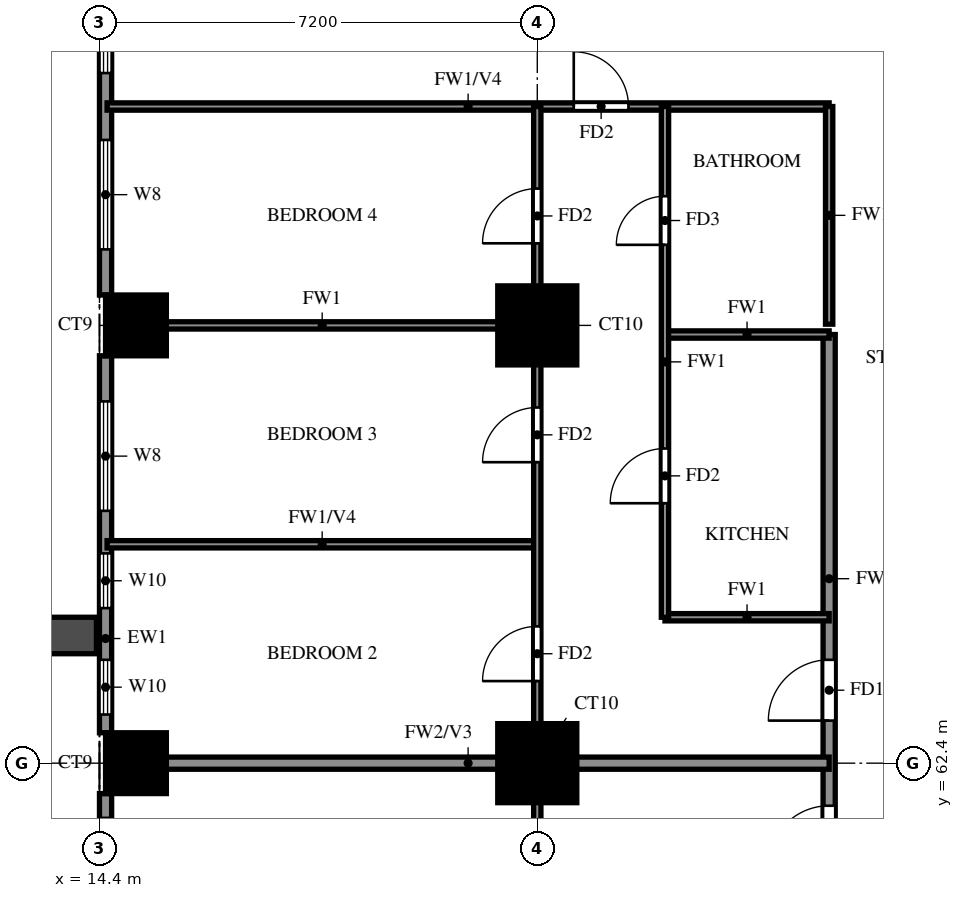
"""IFC4 building model, lengths in metres.
Left out: names, types, materials, properties, quantities, classifications, styles, units other than length and angle.
Written with IfcOpenShell. Run it as: python <this file> out.ifc"""

import sys

from ifc_helpers import new_model, si_unit, direction, frame, frame_2d, origin, origin_2d, place, context, subcontext, project, spatial, rectangle, extrude, source, transform, mapped, element, fill, save


model = new_model("IFC4")
c1 = context("Model", 3, precision=1e-05, world=origin(), true_north=direction((0.0, 1.0)))
c2 = subcontext(c1, "Body", "Model", "MODEL_VIEW")
j1 = project(units=[si_unit("LENGTHUNIT", "METRE"), si_unit("PLANEANGLEUNIT", "RADIAN")], contexts=[c1])
p1 = place(None, origin())
s1 = spatial("IfcSite", under=j1, at=p1, CompositionType="ELEMENT")
p2 = place(p1, origin())
s2 = spatial("IfcBuilding", under=s1, at=p2, CompositionType="ELEMENT")
p3 = place(p2, frame((0.0, 0.0, 72.5)))
s3 = spatial("IfcBuildingStorey", under=s2, at=p3, CompositionType="ELEMENT", Elevation=72.5)
m1 = source(origin(), c2, "Body", "SweptSolid", [
    extrude(rectangle(XDim=1.0, YDim=1.0, at=origin_2d()), origin(), (0.0, 0.0, 1.0), 3.18),
])
p4 = place(p3, frame((15.0, 62.4, 0.0), z_axis=(0.0, 0.0, 1.0), x_axis=(1.0, 0.0, 0.0)))
e1 = element("IfcColumn", 1, at=p4, inside=s3, PredefinedType="COLUMN", context=c2, shape_type="MappedRepresentation", body=[
    mapped(m1, transform((0.0, 0.0, 0.0))),
])
m2 = source(origin(), c2, "Body", "SweptSolid", [
    extrude(rectangle(XDim=1.3, YDim=1.3, at=origin_2d()), origin(), (0.0, 0.0, 1.0), 3.18),
])
p5 = place(p3, frame((21.6, 62.4, 0.0), z_axis=(0.0, 0.0, 1.0), x_axis=(1.0, 0.0, 0.0)))
e2 = element("IfcColumn", 2, at=p5, inside=s3, PredefinedType="COLUMN", context=c2, shape_type="MappedRepresentation", body=[
    mapped(m2, transform((0.0, 0.0, 0.0))),
])
p6 = place(p3, frame((15.0, 69.6, 0.0), z_axis=(0.0, 0.0, 1.0), x_axis=(1.0, 0.0, 0.0)))
e3 = element("IfcColumn", 3, at=p6, inside=s3, PredefinedType="COLUMN", context=c2, shape_type="MappedRepresentation", body=[
    mapped(m1, transform((0.0, 0.0, 0.0))),
])
p7 = place(p3, frame((21.6, 69.6, 0.0), z_axis=(0.0, 0.0, 1.0), x_axis=(1.0, 0.0, 0.0)))
e4 = element("IfcColumn", 4, at=p7, inside=s3, PredefinedType="COLUMN", context=c2, shape_type="MappedRepresentation", body=[
    mapped(m2, transform((0.0, 0.0, 0.0))),
])
p8 = place(p3, frame((14.5, 76.3, 0.0), z_axis=(0.0, 0.0, 1.0), x_axis=(0.0, -1.0, 0.0)))
e5 = element("IfcWall", 5, at=p8, inside=s3, PredefinedType="SOLIDWALL", context=c2, shape_type="SweptSolid", body=[
    extrude(rectangle(XDim=6.2, YDim=0.2, at=frame_2d((3.1, 0.0))), origin(), (0.0, 0.0, 1.0), 3.18),
])
p9 = place(p8, frame((3.65, 0.0, 0.6)))
e6 = element("IfcOpeningElement", 6, at=p9, cuts=e5, PredefinedType="OPENING", context=c2, shape_type="SweptSolid", body=[
    extrude(rectangle(XDim=1.8, YDim=2.4, at=frame_2d((0.9, 1.2))), frame((0.0, 0.11, 0.0), z_axis=(0.0, -1.0, 0.0), x_axis=(1.0, 0.0, 0.0)), (0.0, 0.0, 1.0), 0.22),
])
p10 = place(p8, frame((0.75, 0.0, 0.6)))
e7 = element("IfcOpeningElement", 7, at=p10, cuts=e5, PredefinedType="OPENING", context=c2, shape_type="SweptSolid", body=[
    extrude(rectangle(XDim=1.8, YDim=2.4, at=frame_2d((0.9, 1.2))), frame((0.0, 0.11, 0.0), z_axis=(0.0, -1.0, 0.0), x_axis=(1.0, 0.0, 0.0)), (0.0, 0.0, 1.0), 0.22),
])
p11 = place(p3, frame((14.5, 69.1, 0.0), z_axis=(0.0, 0.0, 1.0), x_axis=(0.0, -1.0, 0.0)))
e8 = element("IfcWall", 8, at=p11, inside=s3, PredefinedType="SOLIDWALL", context=c2, shape_type="SweptSolid", body=[
    extrude(rectangle(XDim=6.2, YDim=0.2, at=frame_2d((3.1, 0.0))), origin(), (0.0, 0.0, 1.0), 3.18),
])
p12 = place(p11, frame((3.25, 0.0, 0.6)))
e9 = element("IfcOpeningElement", 9, at=p12, cuts=e8, PredefinedType="OPENING", context=c2, shape_type="SweptSolid", body=[
    extrude(rectangle(XDim=0.9, YDim=2.4, at=frame_2d((0.45, 1.2))), frame((0.0, 0.11, 0.0), z_axis=(0.0, -1.0, 0.0), x_axis=(1.0, 0.0, 0.0)), (0.0, 0.0, 1.0), 0.22),
])
p13 = place(p11, frame((5.0, 0.0, 0.6)))
e10 = element("IfcOpeningElement", 10, at=p13, cuts=e8, PredefinedType="OPENING", context=c2, shape_type="SweptSolid", body=[
    extrude(rectangle(XDim=0.9, YDim=2.4, at=frame_2d((0.45, 1.2))), frame((0.0, 0.11, 0.0), z_axis=(0.0, -1.0, 0.0), x_axis=(1.0, 0.0, 0.0)), (0.0, 0.0, 1.0), 0.22),
])
p14 = place(p11, frame((0.75, 0.0, 0.6)))
e11 = element("IfcOpeningElement", 11, at=p14, cuts=e8, PredefinedType="OPENING", context=c2, shape_type="SweptSolid", body=[
    extrude(rectangle(XDim=1.8, YDim=2.4, at=frame_2d((0.9, 1.2))), frame((0.0, 0.11, 0.0), z_axis=(0.0, -1.0, 0.0), x_axis=(1.0, 0.0, 0.0)), (0.0, 0.0, 1.0), 0.22),
])
p15 = place(p3, frame((14.5, 61.9, 0.0), z_axis=(0.0, 0.0, 1.0), x_axis=(0.0, -1.0, 0.0)))
e12 = element("IfcWall", 12, at=p15, inside=s3, PredefinedType="SOLIDWALL", context=c2, shape_type="SweptSolid", body=[
    extrude(rectangle(XDim=6.2, YDim=0.2, at=frame_2d((3.1, 0.0))), origin(), (0.0, 0.0, 1.0), 3.18),
])
p16 = place(p15, frame((0.4, 0.0, 0.0)))
e13 = element("IfcOpeningElement", 13, at=p16, cuts=e12, PredefinedType="OPENING", context=c2, shape_type="SweptSolid", body=[
    extrude(rectangle(XDim=1.8, YDim=2.4, at=frame_2d((0.9, 1.2))), frame((0.0, 0.11, 0.0), z_axis=(0.0, -1.0, 0.0), x_axis=(1.0, 0.0, 0.0)), (0.0, 0.0, 1.0), 0.22),
])
p17 = place(p15, frame((4.55, 0.0, 0.6)))
e14 = element("IfcOpeningElement", 14, at=p17, cuts=e12, PredefinedType="OPENING", context=c2, shape_type="SweptSolid", body=[
    extrude(rectangle(XDim=1.2, YDim=2.4, at=frame_2d((0.6, 1.2))), frame((0.0, 0.11, 0.0), z_axis=(0.0, -1.0, 0.0), x_axis=(1.0, 0.0, 0.0)), (0.0, 0.0, 1.0), 0.22),
])
p18 = place(p3, frame((14.35, 64.5, 0.0), z_axis=(0.0, 0.0, 1.0), x_axis=(-1.0, 0.0, 0.0)))
e15 = element("IfcWall", 15, at=p18, inside=s3, PredefinedType="SOLIDWALL", context=c2, shape_type="SweptSolid", body=[
    extrude(rectangle(XDim=2.65, YDim=0.6, at=frame_2d((1.325, 0.0))), origin(), (0.0, 0.0, 1.0), 2.85),
])
p19 = place(p3, frame((26.4, 60.0, 0.0), z_axis=(0.0, 0.0, 1.0), x_axis=(0.0, 1.0, 0.0)))
e16 = element("IfcWall", 16, at=p19, inside=s3, PredefinedType="SOLIDWALL", context=c2, shape_type="SweptSolid", body=[
    extrude(rectangle(XDim=9.45, YDim=0.2, at=frame_2d((4.725, 0.0))), origin(), (0.0, 0.0, 1.0), 3.18),
])
p20 = place(p19, frame((0.7, 0.0, 0.0)))
e17 = element("IfcOpeningElement", 17, at=p20, cuts=e16, PredefinedType="OPENING", context=c2, shape_type="SweptSolid", body=[
    extrude(rectangle(XDim=1.0, YDim=2.1, at=frame_2d((0.5, 1.05))), frame((0.0, 0.11, 0.0), z_axis=(0.0, -1.0, 0.0), x_axis=(1.0, 0.0, 0.0)), (0.0, 0.0, 1.0), 0.22),
])
p21 = place(p19, frame((3.1, 0.0, 0.0)))
e18 = element("IfcOpeningElement", 18, at=p21, cuts=e16, PredefinedType="OPENING", context=c2, shape_type="SweptSolid", body=[
    extrude(rectangle(XDim=1.0, YDim=2.1, at=frame_2d((0.5, 1.05))), frame((0.0, 0.11, 0.0), z_axis=(0.0, -1.0, 0.0), x_axis=(1.0, 0.0, 0.0)), (0.0, 0.0, 1.0), 0.22),
])
p22 = place(p3, frame((14.525, 62.4, 0.0), z_axis=(0.0, 0.0, 1.0), x_axis=(1.0, 0.0, 0.0)))
e19 = element("IfcWall", 19, at=p22, inside=s3, PredefinedType="SOLIDWALL", context=c2, shape_type="SweptSolid", body=[
    extrude(rectangle(XDim=11.875, YDim=0.2, at=frame_2d((5.938, 0.0))), origin(), (0.0, 0.0, 1.0), 3.18),
])
p23 = place(p3, frame((23.7, 64.8, 0.0), z_axis=(0.0, 0.0, 1.0), x_axis=(1.0, 0.0, 0.0)))
e20 = element("IfcWall", 20, at=p23, inside=s3, PredefinedType="PARTITIONING", context=c2, shape_type="SweptSolid", body=[
    extrude(rectangle(XDim=2.7, YDim=0.12, at=frame_2d((1.35, 0.0))), origin(), (0.0, 0.0, 1.0), 3.18),
])
p24 = place(p3, frame((14.525, 66.0, 0.0), z_axis=(0.0, 0.0, 1.0), x_axis=(1.0, 0.0, 0.0)))
e21 = element("IfcWall", 21, at=p24, inside=s3, PredefinedType="PARTITIONING", context=c2, shape_type="SweptSolid", body=[
    extrude(rectangle(XDim=7.075, YDim=0.12, at=frame_2d((3.538, 0.0))), origin(), (0.0, 0.0, 1.0), 2.28),
])
p25 = place(p3, frame((23.7, 69.45, 0.0), z_axis=(0.0, 0.0, 1.0), x_axis=(1.0, 0.0, 0.0)))
e22 = element("IfcWall", 22, at=p25, inside=s3, PredefinedType="PARTITIONING", context=c2, shape_type="SweptSolid", body=[
    extrude(rectangle(XDim=2.7, YDim=0.12, at=frame_2d((1.35, 0.0))), origin(), (0.0, 0.0, 1.0), 3.18),
])
p26 = place(p3, frame((14.525, 69.6, 0.0), z_axis=(0.0, 0.0, 1.0), x_axis=(1.0, 0.0, 0.0)))
e23 = element("IfcWall", 23, at=p26, inside=s3, PredefinedType="PARTITIONING", context=c2, shape_type="SweptSolid", body=[
    extrude(rectangle(XDim=7.075, YDim=0.12, at=frame_2d((3.538, 0.0))), origin(), (0.0, 0.0, 1.0), 3.18),
])
p27 = place(p3, frame((14.525, 73.2, 0.0), z_axis=(0.0, 0.0, 1.0), x_axis=(1.0, 0.0, 0.0)))
e24 = element("IfcWall", 24, at=p27, inside=s3, PredefinedType="PARTITIONING", context=c2, shape_type="SweptSolid", body=[
    extrude(rectangle(XDim=11.875, YDim=0.12, at=frame_2d((5.938, 0.0))), origin(), (0.0, 0.0, 1.0), 2.28),
])
p28 = place(p27, frame((7.675, 0.0, 0.0)))
e25 = element("IfcOpeningElement", 25, at=p28, cuts=e24, PredefinedType="OPENING", context=c2, shape_type="SweptSolid", body=[
    extrude(rectangle(XDim=0.9, YDim=2.1, at=frame_2d((0.45, 1.05))), frame((0.0, 0.07, 0.0), z_axis=(0.0, -1.0, 0.0), x_axis=(1.0, 0.0, 0.0)), (0.0, 0.0, 1.0), 0.14),
])
p29 = place(p3, frame((21.6, 33.725, 0.0), z_axis=(0.0, 0.0, 1.0), x_axis=(0.0, 1.0, 0.0)))
e26 = element("IfcWall", 26, at=p29, inside=s3, PredefinedType="PARTITIONING", context=c2, shape_type="SweptSolid", body=[
    extrude(rectangle(XDim=39.475, YDim=0.12, at=frame_2d((19.737, 0.0))), origin(), (0.0, 0.0, 1.0), 3.18),
])
p30 = place(p29, frame((7.775, 0.0, 0.0)))
e27 = element("IfcOpeningElement", 27, at=p30, cuts=e26, PredefinedType="OPENING", context=c2, shape_type="SweptSolid", body=[
    extrude(rectangle(XDim=0.9, YDim=2.1, at=frame_2d((0.45, 1.05))), frame((0.0, 0.07, 0.0), z_axis=(0.0, -1.0, 0.0), x_axis=(1.0, 0.0, 0.0)), (0.0, 0.0, 1.0), 0.14),
])
p31 = place(p29, frame((17.125, 0.0, 0.0)))
e28 = element("IfcOpeningElement", 28, at=p31, cuts=e26, PredefinedType="OPENING", context=c2, shape_type="SweptSolid", body=[
    extrude(rectangle(XDim=1.5, YDim=2.1, at=frame_2d((0.75, 1.05))), frame((0.0, 0.07, 0.0), z_axis=(0.0, -1.0, 0.0), x_axis=(1.0, 0.0, 0.0)), (0.0, 0.0, 1.0), 0.14),
])
p32 = place(p29, frame((22.825, 0.0, 0.0)))
e29 = element("IfcOpeningElement", 29, at=p32, cuts=e26, PredefinedType="OPENING", context=c2, shape_type="SweptSolid", body=[
    extrude(rectangle(XDim=0.9, YDim=2.1, at=frame_2d((0.45, 1.05))), frame((0.0, 0.07, 0.0), z_axis=(0.0, -1.0, 0.0), x_axis=(1.0, 0.0, 0.0)), (0.0, 0.0, 1.0), 0.14),
])
p33 = place(p29, frame((26.425, 0.0, 0.0)))
e30 = element("IfcOpeningElement", 30, at=p33, cuts=e26, PredefinedType="OPENING", context=c2, shape_type="SweptSolid", body=[
    extrude(rectangle(XDim=0.9, YDim=2.1, at=frame_2d((0.45, 1.05))), frame((0.0, 0.07, 0.0), z_axis=(0.0, -1.0, 0.0), x_axis=(1.0, 0.0, 0.0)), (0.0, 0.0, 1.0), 0.14),
])
p34 = place(p29, frame((30.025, 0.0, 0.0)))
e31 = element("IfcOpeningElement", 31, at=p34, cuts=e26, PredefinedType="OPENING", context=c2, shape_type="SweptSolid", body=[
    extrude(rectangle(XDim=0.9, YDim=2.1, at=frame_2d((0.45, 1.05))), frame((0.0, 0.07, 0.0), z_axis=(0.0, -1.0, 0.0), x_axis=(1.0, 0.0, 0.0)), (0.0, 0.0, 1.0), 0.14),
])
p35 = place(p29, frame((33.625, 0.0, 0.0)))
e32 = element("IfcOpeningElement", 32, at=p35, cuts=e26, PredefinedType="OPENING", context=c2, shape_type="SweptSolid", body=[
    extrude(rectangle(XDim=0.9, YDim=2.1, at=frame_2d((0.45, 1.05))), frame((0.0, 0.07, 0.0), z_axis=(0.0, -1.0, 0.0), x_axis=(1.0, 0.0, 0.0)), (0.0, 0.0, 1.0), 0.14),
])
p36 = place(p29, frame((37.225, 0.0, 0.0)))
e33 = element("IfcOpeningElement", 33, at=p36, cuts=e26, PredefinedType="OPENING", context=c2, shape_type="SweptSolid", body=[
    extrude(rectangle(XDim=0.9, YDim=2.1, at=frame_2d((0.45, 1.05))), frame((0.0, 0.07, 0.0), z_axis=(0.0, -1.0, 0.0), x_axis=(1.0, 0.0, 0.0)), (0.0, 0.0, 1.0), 0.14),
])
p37 = place(p3, frame((23.7, 64.8, 0.0), z_axis=(0.0, 0.0, 1.0), x_axis=(0.0, 1.0, 0.0)))
e34 = element("IfcWall", 34, at=p37, inside=s3, PredefinedType="PARTITIONING", context=c2, shape_type="SweptSolid", body=[
    extrude(rectangle(XDim=8.4, YDim=0.12, at=frame_2d((4.2, 0.0))), origin(), (0.0, 0.0, 1.0), 3.18),
])
p38 = place(p37, frame((1.875, 0.0, 0.0)))
e35 = element("IfcOpeningElement", 35, at=p38, cuts=e34, PredefinedType="OPENING", context=c2, shape_type="SweptSolid", body=[
    extrude(rectangle(XDim=0.9, YDim=2.1, at=frame_2d((0.45, 1.05))), frame((0.0, 0.07, 0.0), z_axis=(0.0, -1.0, 0.0), x_axis=(1.0, 0.0, 0.0)), (0.0, 0.0, 1.0), 0.14),
])
p39 = place(p37, frame((6.125, 0.0, 0.0)))
e36 = element("IfcOpeningElement", 36, at=p39, cuts=e34, PredefinedType="OPENING", context=c2, shape_type="SweptSolid", body=[
    extrude(rectangle(XDim=0.8, YDim=2.1, at=frame_2d((0.4, 1.05))), frame((0.0, 0.07, 0.0), z_axis=(0.0, -1.0, 0.0), x_axis=(1.0, 0.0, 0.0)), (0.0, 0.0, 1.0), 0.14),
])
p40 = place(p3, frame((26.4, 69.62, 0.0), z_axis=(0.0, 0.0, 1.0), x_axis=(0.0, 1.0, 0.0)))
e37 = element("IfcWall", 37, at=p40, inside=s3, PredefinedType="PARTITIONING", context=c2, shape_type="SweptSolid", body=[
    extrude(rectangle(XDim=3.58, YDim=0.12, at=frame_2d((1.79, 0.0))), origin(), (0.0, 0.0, 1.0), 3.18),
])
p41 = place(p9, origin())
e38 = element("IfcWindow", 38, at=p41, inside=s3, PartitioningType="DOUBLE_PANEL_VERTICAL", PredefinedType="WINDOW", context=c2, shape_type="SweptSolid", body=[
    extrude(rectangle(XDim=1.8, YDim=2.4, at=frame_2d((0.9, 1.2))), frame((0.0, 0.03, 0.0), z_axis=(0.0, -1.0, 0.0), x_axis=(1.0, 0.0, 0.0)), (0.0, 0.0, 1.0), 0.06),
])
fill(e6, e38)
p42 = place(p10, origin())
e39 = element("IfcWindow", 39, at=p42, inside=s3, PartitioningType="DOUBLE_PANEL_VERTICAL", PredefinedType="WINDOW", context=c2, shape_type="SweptSolid", body=[
    extrude(rectangle(XDim=1.8, YDim=2.4, at=frame_2d((0.9, 1.2))), frame((0.0, 0.03, 0.0), z_axis=(0.0, -1.0, 0.0), x_axis=(1.0, 0.0, 0.0)), (0.0, 0.0, 1.0), 0.06),
])
fill(e7, e39)
p43 = place(p12, origin())
e40 = element("IfcWindow", 40, at=p43, inside=s3, PartitioningType="SINGLE_PANEL", PredefinedType="WINDOW", context=c2, shape_type="SweptSolid", body=[
    extrude(rectangle(XDim=0.9, YDim=2.4, at=frame_2d((0.45, 1.2))), frame((0.0, 0.03, 0.0), z_axis=(0.0, -1.0, 0.0), x_axis=(1.0, 0.0, 0.0)), (0.0, 0.0, 1.0), 0.06),
])
fill(e9, e40)
p44 = place(p13, origin())
e41 = element("IfcWindow", 41, at=p44, inside=s3, PartitioningType="SINGLE_PANEL", PredefinedType="WINDOW", context=c2, shape_type="SweptSolid", body=[
    extrude(rectangle(XDim=0.9, YDim=2.4, at=frame_2d((0.45, 1.2))), frame((0.0, 0.03, 0.0), z_axis=(0.0, -1.0, 0.0), x_axis=(1.0, 0.0, 0.0)), (0.0, 0.0, 1.0), 0.06),
])
fill(e10, e41)
p45 = place(p14, origin())
e42 = element("IfcWindow", 42, at=p45, inside=s3, PartitioningType="DOUBLE_PANEL_VERTICAL", PredefinedType="WINDOW", context=c2, shape_type="SweptSolid", body=[
    extrude(rectangle(XDim=1.8, YDim=2.4, at=frame_2d((0.9, 1.2))), frame((0.0, 0.03, 0.0), z_axis=(0.0, -1.0, 0.0), x_axis=(1.0, 0.0, 0.0)), (0.0, 0.0, 1.0), 0.06),
])
fill(e11, e42)
p46 = place(p16, origin())
e43 = element("IfcDoor", 43, at=p46, inside=s3, OperationType="DOUBLE_DOOR_SLIDING", PredefinedType="DOOR", context=c2, shape_type="SweptSolid", body=[
    extrude(rectangle(XDim=1.8, YDim=2.4, at=frame_2d((0.9, 1.2))), frame((0.0, 0.025, 0.0), z_axis=(0.0, -1.0, 0.0), x_axis=(1.0, 0.0, 0.0)), (0.0, 0.0, 1.0), 0.05),
])
fill(e13, e43)
p47 = place(p20, origin())
e44 = element("IfcDoor", 44, at=p47, inside=s3, OperationType="SINGLE_SWING_RIGHT", PredefinedType="DOOR", context=c2, shape_type="SweptSolid", body=[
    extrude(rectangle(XDim=1.0, YDim=2.1, at=frame_2d((0.5, 1.05))), frame((0.0, 0.025, 0.0), z_axis=(0.0, -1.0, 0.0), x_axis=(1.0, 0.0, 0.0)), (0.0, 0.0, 1.0), 0.05),
])
fill(e17, e44)
p48 = place(p21, origin())
e45 = element("IfcDoor", 45, at=p48, inside=s3, OperationType="SINGLE_SWING_LEFT", PredefinedType="DOOR", context=c2, shape_type="SweptSolid", body=[
    extrude(rectangle(XDim=1.0, YDim=2.1, at=frame_2d((0.5, 1.05))), frame((0.0, 0.025, 0.0), z_axis=(0.0, -1.0, 0.0), x_axis=(1.0, 0.0, 0.0)), (0.0, 0.0, 1.0), 0.05),
])
fill(e18, e45)
p49 = place(p34, origin())
e46 = element("IfcDoor", 46, at=p49, inside=s3, OperationType="SINGLE_SWING_LEFT", PredefinedType="DOOR", context=c2, shape_type="SweptSolid", body=[
    extrude(rectangle(XDim=0.9, YDim=2.1, at=frame_2d((0.45, 1.05))), frame((0.0, 0.025, 0.0), z_axis=(0.0, -1.0, 0.0), x_axis=(1.0, 0.0, 0.0)), (0.0, 0.0, 1.0), 0.05),
])
fill(e31, e46)
p50 = place(p35, origin())
e47 = element("IfcDoor", 47, at=p50, inside=s3, OperationType="SINGLE_SWING_RIGHT", PredefinedType="DOOR", context=c2, shape_type="SweptSolid", body=[
    extrude(rectangle(XDim=0.9, YDim=2.1, at=frame_2d((0.45, 1.05))), frame((0.0, 0.025, 0.0), z_axis=(0.0, -1.0, 0.0), x_axis=(1.0, 0.0, 0.0)), (0.0, 0.0, 1.0), 0.05),
])
fill(e32, e47)
p51 = place(p36, origin())
e48 = element("IfcDoor", 48, at=p51, inside=s3, OperationType="SINGLE_SWING_LEFT", PredefinedType="DOOR", context=c2, shape_type="SweptSolid", body=[
    extrude(rectangle(XDim=0.9, YDim=2.1, at=frame_2d((0.45, 1.05))), frame((0.0, 0.025, 0.0), z_axis=(0.0, -1.0, 0.0), x_axis=(1.0, 0.0, 0.0)), (0.0, 0.0, 1.0), 0.05),
])
fill(e33, e48)
p52 = place(p28, origin())
e49 = element("IfcDoor", 49, at=p52, inside=s3, OperationType="SINGLE_SWING_LEFT", PredefinedType="DOOR", context=c2, shape_type="SweptSolid", body=[
    extrude(rectangle(XDim=0.9, YDim=2.1, at=frame_2d((0.45, 1.05))), frame((0.0, 0.025, 0.0), z_axis=(0.0, -1.0, 0.0), x_axis=(1.0, 0.0, 0.0)), (0.0, 0.0, 1.0), 0.05),
])
fill(e25, e49)
p53 = place(p38, origin())
e50 = element("IfcDoor", 50, at=p53, inside=s3, OperationType="SINGLE_SWING_RIGHT", PredefinedType="DOOR", context=c2, shape_type="SweptSolid", body=[
    extrude(rectangle(XDim=0.9, YDim=2.1, at=frame_2d((0.45, 1.05))), frame((0.0, 0.025, 0.0), z_axis=(0.0, -1.0, 0.0), x_axis=(1.0, 0.0, 0.0)), (0.0, 0.0, 1.0), 0.05),
])
fill(e35, e50)
p54 = place(p39, origin())
e51 = element("IfcDoor", 51, at=p54, inside=s3, OperationType="SINGLE_SWING_LEFT", PredefinedType="DOOR", context=c2, shape_type="SweptSolid", body=[
    extrude(rectangle(XDim=0.8, YDim=2.1, at=frame_2d((0.4, 1.05))), frame((0.0, 0.025, 0.0), z_axis=(0.0, -1.0, 0.0), x_axis=(1.0, 0.0, 0.0)), (0.0, 0.0, 1.0), 0.05),
])
fill(e36, e51)
save(model, sys.argv[1])
